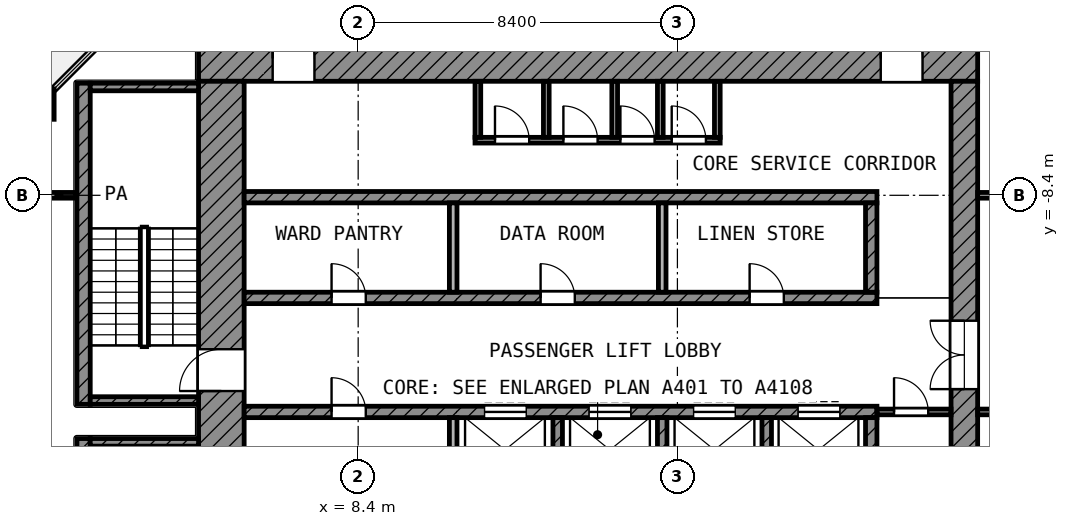
"""IFC4 building model, lengths in metres.
Left out: names, types, materials, properties, quantities, classifications, styles, units other than length and angle.
Written with IfcOpenShell. Run it as: python <this file> out.ifc"""

import sys

from ifc_helpers import new_model, si_unit, direction, frame, frame_2d, origin, origin_2d, place, context, subcontext, project, spatial, rectangle, extrude, element, fill, save


model = new_model("IFC4")
c1 = context("Model", 3, precision=1e-05, world=origin(), true_north=direction((0.0, 1.0)))
c2 = subcontext(c1, "Body", "Model", "MODEL_VIEW")
j1 = project(units=[si_unit("LENGTHUNIT", "METRE"), si_unit("PLANEANGLEUNIT", "RADIAN")], contexts=[c1])
p1 = place(None, origin())
s1 = spatial("IfcSite", under=j1, at=p1, CompositionType="ELEMENT")
p2 = place(p1, origin())
s2 = spatial("IfcBuilding", under=s1, at=p2, CompositionType="ELEMENT")
p3 = place(p2, frame((0.0, 0.0, 328.0)))
s3 = spatial("IfcBuildingStorey", under=s2, at=p3, CompositionType="ELEMENT", Elevation=328.0)
p4 = place(p3, frame((0.0, -6.0, 0.0), z_axis=(0.0, 0.0, 1.0), x_axis=(1.0, 0.0, 0.0)))
e1 = element("IfcColumn", 1, at=p4, inside=s3, PredefinedType="COLUMN", context=c2, shape_type="SweptSolid", body=[
    extrude(rectangle(XDim=0.8, YDim=0.8, at=origin_2d()), origin(), (0.0, 0.0, 1.0), 4.2),
])
p5 = place(p3, frame((4.2, -4.8, 0.0), z_axis=(0.0, 0.0, 1.0), x_axis=(1.0, 0.0, 0.0)))
e2 = element("IfcWall", 2, at=p5, inside=s3, PredefinedType="SHEAR", context=c2, shape_type="SweptSolid", body=[
    extrude(rectangle(XDim=20.5, YDim=1.2, at=frame_2d((10.25, 0.0))), origin(), (0.0, 0.0, 1.0), 3.78),
])
p6 = place(p5, frame((1.95, 0.0, 0.0)))
e3 = element("IfcOpeningElement", 3, at=p6, cuts=e2, PredefinedType="OPENING", context=c2, shape_type="SweptSolid", body=[
    extrude(rectangle(XDim=1.1, YDim=2.1, at=frame_2d((0.55, 1.05))), frame((0.0, 0.61, 0.0), z_axis=(0.0, -1.0, 0.0), x_axis=(1.0, 0.0, 0.0)), (0.0, 0.0, 1.0), 1.22),
])
p7 = place(p5, frame((17.95, 0.0, 0.0)))
e4 = element("IfcOpeningElement", 4, at=p7, cuts=e2, PredefinedType="OPENING", context=c2, shape_type="SweptSolid", body=[
    extrude(rectangle(XDim=1.1, YDim=2.1, at=frame_2d((0.55, 1.05))), frame((0.0, 0.61, 0.0), z_axis=(0.0, -1.0, 0.0), x_axis=(1.0, 0.0, 0.0)), (0.0, 0.0, 1.0), 1.22),
])
p8 = place(p3, frame((4.8, -24.7, 0.0), z_axis=(0.0, 0.0, 1.0), x_axis=(0.0, 1.0, 0.0)))
e5 = element("IfcWall", 5, at=p8, inside=s3, PredefinedType="SHEAR", context=c2, shape_type="SweptSolid", body=[
    extrude(rectangle(XDim=19.3, YDim=1.2, at=frame_2d((9.65, 0.0))), origin(), (0.0, 0.0, 1.0), 3.78),
])
p9 = place(p8, frame((11.15, 0.0, 0.0)))
e6 = element("IfcOpeningElement", 6, at=p9, cuts=e5, PredefinedType="OPENING", context=c2, shape_type="SweptSolid", body=[
    extrude(rectangle(XDim=1.1, YDim=2.1, at=frame_2d((0.55, 1.05))), frame((0.0, 0.61, 0.0), z_axis=(0.0, -1.0, 0.0), x_axis=(1.0, 0.0, 0.0)), (0.0, 0.0, 1.0), 1.22),
])
p10 = place(p8, frame((1.85, 0.0, 0.0)))
e7 = element("IfcOpeningElement", 7, at=p10, cuts=e5, PredefinedType="OPENING", context=c2, shape_type="SweptSolid", body=[
    extrude(rectangle(XDim=1.1, YDim=2.1, at=frame_2d((0.55, 1.05))), frame((0.0, 0.61, 0.0), z_axis=(0.0, -1.0, 0.0), x_axis=(1.0, 0.0, 0.0)), (0.0, 0.0, 1.0), 1.22),
])
p11 = place(p3, frame((24.35, -24.0, 0.0), z_axis=(0.0, 0.0, 1.0), x_axis=(0.0, 1.0, 0.0)))
e8 = element("IfcWall", 8, at=p11, inside=s3, PredefinedType="SHEAR", context=c2, shape_type="SweptSolid", body=[
    extrude(rectangle(XDim=18.6, YDim=0.7, at=frame_2d((9.3, 0.0))), origin(), (0.0, 0.0, 1.0), 3.78),
])
p12 = place(p11, frame((10.5, 0.0, 0.0)))
e9 = element("IfcOpeningElement", 9, at=p12, cuts=e8, PredefinedType="OPENING", context=c2, shape_type="SweptSolid", body=[
    extrude(rectangle(XDim=1.8, YDim=2.1, at=frame_2d((0.9, 1.05))), frame((0.0, 0.36, 0.0), z_axis=(0.0, -1.0, 0.0), x_axis=(1.0, 0.0, 0.0)), (0.0, 0.0, 1.0), 0.72),
])
p13 = place(p3, frame((5.4, -8.45, 0.0), z_axis=(0.0, 0.0, 1.0), x_axis=(1.0, 0.0, 0.0)))
e10 = element("IfcWall", 10, at=p13, inside=s3, PredefinedType="SHEAR", context=c2, shape_type="SweptSolid", body=[
    extrude(rectangle(XDim=16.65, YDim=0.3, at=frame_2d((8.325, 0.0))), origin(), (0.0, 0.0, 1.0), 3.78),
])
p14 = place(p3, frame((5.4, -11.1, 0.0), z_axis=(0.0, 0.0, 1.0), x_axis=(1.0, 0.0, 0.0)))
e11 = element("IfcWall", 11, at=p14, inside=s3, PredefinedType="SHEAR", context=c2, shape_type="SweptSolid", body=[
    extrude(rectangle(XDim=16.65, YDim=0.3, at=frame_2d((8.325, 0.0))), origin(), (0.0, 0.0, 1.0), 3.78),
])
p15 = place(p14, frame((2.3, 0.0, 0.0)))
e12 = element("IfcOpeningElement", 12, at=p15, cuts=e11, PredefinedType="OPENING", context=c2, shape_type="SweptSolid", body=[
    extrude(rectangle(XDim=0.9, YDim=2.1, at=frame_2d((0.45, 1.05))), frame((0.0, 0.16, 0.0), z_axis=(0.0, -1.0, 0.0), x_axis=(1.0, 0.0, 0.0)), (0.0, 0.0, 1.0), 0.32),
])
p16 = place(p14, frame((7.8, 0.0, 0.0)))
e13 = element("IfcOpeningElement", 13, at=p16, cuts=e11, PredefinedType="OPENING", context=c2, shape_type="SweptSolid", body=[
    extrude(rectangle(XDim=0.9, YDim=2.1, at=frame_2d((0.45, 1.05))), frame((0.0, 0.16, 0.0), z_axis=(0.0, -1.0, 0.0), x_axis=(1.0, 0.0, 0.0)), (0.0, 0.0, 1.0), 0.32),
])
p17 = place(p14, frame((13.3, 0.0, 0.0)))
e14 = element("IfcOpeningElement", 14, at=p17, cuts=e11, PredefinedType="OPENING", context=c2, shape_type="SweptSolid", body=[
    extrude(rectangle(XDim=0.9, YDim=2.1, at=frame_2d((0.45, 1.05))), frame((0.0, 0.16, 0.0), z_axis=(0.0, -1.0, 0.0), x_axis=(1.0, 0.0, 0.0)), (0.0, 0.0, 1.0), 0.32),
])
p18 = place(p3, frame((5.4, -14.1, 0.0), z_axis=(0.0, 0.0, 1.0), x_axis=(1.0, 0.0, 0.0)))
e15 = element("IfcWall", 15, at=p18, inside=s3, PredefinedType="SHEAR", context=c2, shape_type="SweptSolid", body=[
    extrude(rectangle(XDim=16.65, YDim=0.3, at=frame_2d((8.325, 0.0))), origin(), (0.0, 0.0, 1.0), 3.78),
])
p19 = place(p18, frame((6.325, 0.0, 0.0)))
e16 = element("IfcOpeningElement", 16, at=p19, cuts=e15, PredefinedType="OPENING", context=c2, shape_type="SweptSolid", body=[
    extrude(rectangle(XDim=1.1, YDim=2.1, at=frame_2d((0.55, 1.05))), frame((0.0, 0.16, 0.0), z_axis=(0.0, -1.0, 0.0), x_axis=(1.0, 0.0, 0.0)), (0.0, 0.0, 1.0), 0.32),
])
p20 = place(p18, frame((9.075, 0.0, 0.0)))
e17 = element("IfcOpeningElement", 17, at=p20, cuts=e15, PredefinedType="OPENING", context=c2, shape_type="SweptSolid", body=[
    extrude(rectangle(XDim=1.1, YDim=2.1, at=frame_2d((0.55, 1.05))), frame((0.0, 0.16, 0.0), z_axis=(0.0, -1.0, 0.0), x_axis=(1.0, 0.0, 0.0)), (0.0, 0.0, 1.0), 0.32),
])
p21 = place(p18, frame((11.825, 0.0, 0.0)))
e18 = element("IfcOpeningElement", 18, at=p21, cuts=e15, PredefinedType="OPENING", context=c2, shape_type="SweptSolid", body=[
    extrude(rectangle(XDim=1.1, YDim=2.1, at=frame_2d((0.55, 1.05))), frame((0.0, 0.16, 0.0), z_axis=(0.0, -1.0, 0.0), x_axis=(1.0, 0.0, 0.0)), (0.0, 0.0, 1.0), 0.32),
])
p22 = place(p18, frame((14.575, 0.0, 0.0)))
e19 = element("IfcOpeningElement", 19, at=p22, cuts=e15, PredefinedType="OPENING", context=c2, shape_type="SweptSolid", body=[
    extrude(rectangle(XDim=1.1, YDim=2.1, at=frame_2d((0.55, 1.05))), frame((0.0, 0.16, 0.0), z_axis=(0.0, -1.0, 0.0), x_axis=(1.0, 0.0, 0.0)), (0.0, 0.0, 1.0), 0.32),
])
p23 = place(p18, frame((2.3, 0.0, 0.0)))
e20 = element("IfcOpeningElement", 20, at=p23, cuts=e15, PredefinedType="OPENING", context=c2, shape_type="SweptSolid", body=[
    extrude(rectangle(XDim=0.9, YDim=2.1, at=frame_2d((0.45, 1.05))), frame((0.0, 0.16, 0.0), z_axis=(0.0, -1.0, 0.0), x_axis=(1.0, 0.0, 0.0)), (0.0, 0.0, 1.0), 0.32),
])
p24 = place(p3, frame((21.9, -10.95, 0.0), z_axis=(0.0, 0.0, 1.0), x_axis=(0.0, 1.0, 0.0)))
e21 = element("IfcWall", 21, at=p24, inside=s3, PredefinedType="SHEAR", context=c2, shape_type="SweptSolid", body=[
    extrude(rectangle(XDim=2.35, YDim=0.3, at=frame_2d((1.175, 0.0))), origin(), (0.0, 0.0, 1.0), 3.78),
])
p25 = place(p3, frame((21.9, -16.6, 0.0), z_axis=(0.0, 0.0, 1.0), x_axis=(0.0, 1.0, 0.0)))
e22 = element("IfcWall", 22, at=p25, inside=s3, PredefinedType="SHEAR", context=c2, shape_type="SweptSolid", body=[
    extrude(rectangle(XDim=2.35, YDim=0.3, at=frame_2d((1.175, 0.0))), origin(), (0.0, 0.0, 1.0), 3.78),
])
for number, where, z_axis, x_axis in (
    (23, (10.9, -10.95, 0.0), (0.0, 0.0, 1.0), (0.0, 1.0, 0.0)),
    (24, (16.4, -10.95, 0.0), (0.0, 0.0, 1.0), (0.0, 1.0, 0.0)),
):
    element("IfcWall", number, at=place(p3, frame(where, z_axis=z_axis, x_axis=x_axis)), inside=s3, PredefinedType="PARTITIONING", context=c2, shape_type="SweptSolid", body=[
        extrude(rectangle(XDim=2.35, YDim=0.2, at=frame_2d((1.175, 0.0))), origin(), (0.0, 0.0, 1.0), 3.78),
    ])
p26 = place(p3, frame((10.9, -16.6, 0.0), z_axis=(0.0, 0.0, 1.0), x_axis=(0.0, 1.0, 0.0)))
e25 = element("IfcWall", 25, at=p26, inside=s3, PredefinedType="PARTITIONING", context=c2, shape_type="SweptSolid", body=[
    extrude(rectangle(XDim=2.35, YDim=0.2, at=frame_2d((1.175, 0.0))), origin(), (0.0, 0.0, 1.0), 3.78),
])
for number, where, z_axis, x_axis in (
    (26, (13.65, -16.6, 0.0), (0.0, 0.0, 1.0), (0.0, 1.0, 0.0)),
    (27, (16.4, -16.6, 0.0), (0.0, 0.0, 1.0), (0.0, 1.0, 0.0)),
    (28, (19.15, -16.6, 0.0), (0.0, 0.0, 1.0), (0.0, 1.0, 0.0)),
):
    element("IfcWall", number, at=place(p3, frame(where, z_axis=z_axis, x_axis=x_axis)), inside=s3, PredefinedType="SHEAR", context=c2, shape_type="SweptSolid", body=[
        extrude(rectangle(XDim=2.35, YDim=0.25, at=frame_2d((1.175, 0.0))), origin(), (0.0, 0.0, 1.0), 3.78),
    ])
p27 = place(p3, frame((22.05, -14.1, 0.0), z_axis=(0.0, 0.0, 1.0), x_axis=(1.0, 0.0, 0.0)))
e29 = element("IfcWall", 29, at=p27, inside=s3, PredefinedType="PARTITIONING", context=c2, shape_type="SweptSolid", body=[
    extrude(rectangle(XDim=1.95, YDim=0.15, at=frame_2d((0.975, 0.0))), origin(), (0.0, 0.0, 1.0), 3.78),
])
p28 = place(p27, frame((0.45, 0.0, 0.0)))
e30 = element("IfcOpeningElement", 30, at=p28, cuts=e29, PredefinedType="OPENING", context=c2, shape_type="SweptSolid", body=[
    extrude(rectangle(XDim=0.9, YDim=2.1, at=frame_2d((0.45, 1.05))), frame((0.0, 0.085, 0.0), z_axis=(0.0, -1.0, 0.0), x_axis=(1.0, 0.0, 0.0)), (0.0, 0.0, 1.0), 0.17),
])
p29 = place(p3, frame((11.475, -6.95, 0.0), z_axis=(0.0, 0.0, 1.0), x_axis=(1.0, 0.0, 0.0)))
e31 = element("IfcWall", 31, at=p29, inside=s3, PredefinedType="PARTITIONING", context=c2, shape_type="SweptSolid", body=[
    extrude(rectangle(XDim=6.45, YDim=0.15, at=frame_2d((3.225, 0.0))), origin(), (0.0, 0.0, 1.0), 3.78),
])
p30 = place(p29, frame((0.525, 0.0, 0.0)))
e32 = element("IfcOpeningElement", 32, at=p30, cuts=e31, PredefinedType="OPENING", context=c2, shape_type="SweptSolid", body=[
    extrude(rectangle(XDim=0.9, YDim=2.1, at=frame_2d((0.45, 1.05))), frame((0.0, 0.085, 0.0), z_axis=(0.0, -1.0, 0.0), x_axis=(1.0, 0.0, 0.0)), (0.0, 0.0, 1.0), 0.17),
])
p31 = place(p29, frame((2.325, 0.0, 0.0)))
e33 = element("IfcOpeningElement", 33, at=p31, cuts=e31, PredefinedType="OPENING", context=c2, shape_type="SweptSolid", body=[
    extrude(rectangle(XDim=0.9, YDim=2.1, at=frame_2d((0.45, 1.05))), frame((0.0, 0.085, 0.0), z_axis=(0.0, -1.0, 0.0), x_axis=(1.0, 0.0, 0.0)), (0.0, 0.0, 1.0), 0.17),
])
p32 = place(p29, frame((3.825, 0.0, 0.0)))
e34 = element("IfcOpeningElement", 34, at=p32, cuts=e31, PredefinedType="OPENING", context=c2, shape_type="SweptSolid", body=[
    extrude(rectangle(XDim=0.9, YDim=2.1, at=frame_2d((0.45, 1.05))), frame((0.0, 0.085, 0.0), z_axis=(0.0, -1.0, 0.0), x_axis=(1.0, 0.0, 0.0)), (0.0, 0.0, 1.0), 0.17),
])
p33 = place(p29, frame((5.175, 0.0, 0.0)))
e35 = element("IfcOpeningElement", 35, at=p33, cuts=e31, PredefinedType="OPENING", context=c2, shape_type="SweptSolid", body=[
    extrude(rectangle(XDim=0.9, YDim=2.1, at=frame_2d((0.45, 1.05))), frame((0.0, 0.085, 0.0), z_axis=(0.0, -1.0, 0.0), x_axis=(1.0, 0.0, 0.0)), (0.0, 0.0, 1.0), 0.17),
])
for number, where, z_axis, x_axis in (
    (36, (11.55, -6.875, 0.0), (0.0, 0.0, 1.0), (0.0, 1.0, 0.0)),
    (37, (13.35, -6.875, 0.0), (0.0, 0.0, 1.0), (0.0, 1.0, 0.0)),
    (38, (15.15, -6.875, 0.0), (0.0, 0.0, 1.0), (0.0, 1.0, 0.0)),
    (39, (16.35, -6.875, 0.0), (0.0, 0.0, 1.0), (0.0, 1.0, 0.0)),
    (40, (17.85, -6.875, 0.0), (0.0, 0.0, 1.0), (0.0, 1.0, 0.0)),
):
    element("IfcWall", number, at=place(p3, frame(where, z_axis=z_axis, x_axis=x_axis)), inside=s3, PredefinedType="PARTITIONING", context=c2, shape_type="SweptSolid", body=[
        extrude(rectangle(XDim=1.475, YDim=0.15, at=frame_2d((0.738, 0.0))), origin(), (0.0, 0.0, 1.0), 3.78),
    ])
p34 = place(p3, frame((1.175, -13.9, 0.0), z_axis=(0.0, 0.0, 1.0), x_axis=(0.0, 1.0, 0.0)))
e41 = element("IfcWall", 41, at=p34, inside=s3, PredefinedType="SHEAR", context=c2, shape_type="SweptSolid", body=[
    extrude(rectangle(XDim=8.45, YDim=0.35, at=frame_2d((4.225, 0.0))), origin(), (0.0, 0.0, 1.0), 3.78),
])
for number, where, z_axis, x_axis in (
    (42, (1.35, -5.55, 0.0), (0.0, 0.0, 1.0), (1.0, 0.0, 0.0)),
    (43, (1.35, -13.8, 0.0), (0.0, 0.0, 1.0), (1.0, 0.0, 0.0)),
):
    element("IfcWall", number, at=place(p3, frame(where, z_axis=z_axis, x_axis=x_axis)), inside=s3, PredefinedType="SHEAR", context=c2, shape_type="SweptSolid", body=[
        extrude(rectangle(XDim=2.85, YDim=0.2, at=frame_2d((1.425, 0.0))), origin(), (0.0, 0.0, 1.0), 3.78),
    ])
p35 = place(p3, frame((1.175, -23.25, 0.0), z_axis=(0.0, 0.0, 1.0), x_axis=(0.0, 1.0, 0.0)))
e44 = element("IfcWall", 44, at=p35, inside=s3, PredefinedType="SHEAR", context=c2, shape_type="SweptSolid", body=[
    extrude(rectangle(XDim=8.45, YDim=0.35, at=frame_2d((4.225, 0.0))), origin(), (0.0, 0.0, 1.0), 3.78),
])
p36 = place(p3, frame((1.35, -14.9, 0.0), z_axis=(0.0, 0.0, 1.0), x_axis=(1.0, 0.0, 0.0)))
e45 = element("IfcWall", 45, at=p36, inside=s3, PredefinedType="SHEAR", context=c2, shape_type="SweptSolid", body=[
    extrude(rectangle(XDim=2.85, YDim=0.2, at=frame_2d((1.425, 0.0))), origin(), (0.0, 0.0, 1.0), 3.78),
])
p37 = place(p3, frame((24.7, -14.1, 0.0), z_axis=(0.0, 0.0, 1.0), x_axis=(1.0, 0.0, 0.0)))
e46 = element("IfcWall", 46, at=p37, inside=s3, PredefinedType="PARTITIONING", context=c2, shape_type="SweptSolid", body=[
    extrude(rectangle(XDim=4.625, YDim=0.15, at=frame_2d((2.312, 0.0))), origin(), (0.0, 0.0, 1.0), 3.78),
])
p38 = place(p37, frame((1.85, 0.0, 0.0)))
e47 = element("IfcOpeningElement", 47, at=p38, cuts=e46, PredefinedType="OPENING", context=c2, shape_type="SweptSolid", body=[
    extrude(rectangle(XDim=1.5, YDim=2.1, at=frame_2d((0.75, 1.05))), frame((0.0, 0.085, 0.0), z_axis=(0.0, -1.0, 0.0), x_axis=(1.0, 0.0, 0.0)), (0.0, 0.0, 1.0), 0.17),
])
p39 = place(p3, frame((0.08, -8.4, 0.0), z_axis=(0.0, 0.0, 1.0), x_axis=(1.0, 0.0, 0.0)))
e48 = element("IfcWall", 48, at=p39, inside=s3, PredefinedType="PARTITIONING", context=c2, shape_type="SweptSolid", body=[
    extrude(rectangle(XDim=0.89, YDim=0.15, at=frame_2d((0.445, 0.0))), origin(), (0.0, 0.0, 1.0), 3.78),
])
p40 = place(p3, frame((24.7, -8.4, 0.0), z_axis=(0.0, 0.0, 1.0), x_axis=(1.0, 0.0, 0.0)))
e49 = element("IfcWall", 49, at=p40, inside=s3, PredefinedType="PARTITIONING", context=c2, shape_type="SweptSolid", body=[
    extrude(rectangle(XDim=15.582, YDim=0.15, at=frame_2d((7.791, 0.0))), origin(), (0.0, 0.0, 1.0), 3.78),
])
p41 = place(p40, frame((1.85, 0.0, 0.0)))
e50 = element("IfcOpeningElement", 50, at=p41, cuts=e49, PredefinedType="OPENING", context=c2, shape_type="SweptSolid", body=[
    extrude(rectangle(XDim=1.2, YDim=2.1, at=frame_2d((0.6, 1.05))), frame((0.0, 0.085, 0.0), z_axis=(0.0, -1.0, 0.0), x_axis=(1.0, 0.0, 0.0)), (0.0, 0.0, 1.0), 0.17),
])
p42 = place(p40, frame((6.7, 0.0, 0.0)))
e51 = element("IfcOpeningElement", 51, at=p42, cuts=e49, PredefinedType="OPENING", context=c2, shape_type="SweptSolid", body=[
    extrude(rectangle(XDim=1.2, YDim=2.1, at=frame_2d((0.6, 1.05))), frame((0.0, 0.085, 0.0), z_axis=(0.0, -1.0, 0.0), x_axis=(1.0, 0.0, 0.0)), (0.0, 0.0, 1.0), 0.17),
])
p43 = place(p40, frame((9.4, 0.0, 0.0)))
e52 = element("IfcOpeningElement", 52, at=p43, cuts=e49, PredefinedType="OPENING", context=c2, shape_type="SweptSolid", body=[
    extrude(rectangle(XDim=1.2, YDim=2.1, at=frame_2d((0.6, 1.05))), frame((0.0, 0.085, 0.0), z_axis=(0.0, -1.0, 0.0), x_axis=(1.0, 0.0, 0.0)), (0.0, 0.0, 1.0), 0.17),
])
p44 = place(p19, origin())
e53 = element("IfcDoor", 53, at=p44, inside=s3, OperationType="DOUBLE_DOOR_SLIDING", PredefinedType="DOOR", context=c2, shape_type="SweptSolid", body=[
    extrude(rectangle(XDim=1.1, YDim=2.1, at=frame_2d((0.55, 1.05))), frame((0.0, 0.025, 0.0), z_axis=(0.0, -1.0, 0.0), x_axis=(1.0, 0.0, 0.0)), (0.0, 0.0, 1.0), 0.05),
])
fill(e16, e53)
p45 = place(p20, origin())
e54 = element("IfcDoor", 54, at=p45, inside=s3, OperationType="DOUBLE_DOOR_SLIDING", PredefinedType="DOOR", context=c2, shape_type="SweptSolid", body=[
    extrude(rectangle(XDim=1.1, YDim=2.1, at=frame_2d((0.55, 1.05))), frame((0.0, 0.025, 0.0), z_axis=(0.0, -1.0, 0.0), x_axis=(1.0, 0.0, 0.0)), (0.0, 0.0, 1.0), 0.05),
])
fill(e17, e54)
p46 = place(p21, origin())
e55 = element("IfcDoor", 55, at=p46, inside=s3, OperationType="DOUBLE_DOOR_SLIDING", PredefinedType="DOOR", context=c2, shape_type="SweptSolid", body=[
    extrude(rectangle(XDim=1.1, YDim=2.1, at=frame_2d((0.55, 1.05))), frame((0.0, 0.025, 0.0), z_axis=(0.0, -1.0, 0.0), x_axis=(1.0, 0.0, 0.0)), (0.0, 0.0, 1.0), 0.05),
])
fill(e18, e55)
p47 = place(p22, origin())
e56 = element("IfcDoor", 56, at=p47, inside=s3, OperationType="DOUBLE_DOOR_SLIDING", PredefinedType="DOOR", context=c2, shape_type="SweptSolid", body=[
    extrude(rectangle(XDim=1.1, YDim=2.1, at=frame_2d((0.55, 1.05))), frame((0.0, 0.025, 0.0), z_axis=(0.0, -1.0, 0.0), x_axis=(1.0, 0.0, 0.0)), (0.0, 0.0, 1.0), 0.05),
])
fill(e19, e56)
p48 = place(p9, origin())
e57 = element("IfcDoor", 57, at=p48, inside=s3, OperationType="SINGLE_SWING_LEFT", PredefinedType="DOOR", context=c2, shape_type="SweptSolid", body=[
    extrude(rectangle(XDim=1.1, YDim=2.1, at=frame_2d((0.55, 1.05))), frame((0.0, 0.025, 0.0), z_axis=(0.0, -1.0, 0.0), x_axis=(1.0, 0.0, 0.0)), (0.0, 0.0, 1.0), 0.05),
])
fill(e6, e57)
p49 = place(p6, origin())
e58 = element("IfcDoor", 58, at=p49, inside=s3, OperationType="SINGLE_SWING_LEFT", PredefinedType="DOOR", context=c2, shape_type="SweptSolid", body=[
    extrude(rectangle(XDim=1.1, YDim=2.1, at=frame_2d((0.55, 1.05))), frame((0.0, 0.025, 0.0), z_axis=(0.0, -1.0, 0.0), x_axis=(1.0, 0.0, 0.0)), (0.0, 0.0, 1.0), 0.05),
])
fill(e3, e58)
p50 = place(p7, origin())
e59 = element("IfcDoor", 59, at=p50, inside=s3, OperationType="SINGLE_SWING_LEFT", PredefinedType="DOOR", context=c2, shape_type="SweptSolid", body=[
    extrude(rectangle(XDim=1.1, YDim=2.1, at=frame_2d((0.55, 1.05))), frame((0.0, 0.025, 0.0), z_axis=(0.0, -1.0, 0.0), x_axis=(1.0, 0.0, 0.0)), (0.0, 0.0, 1.0), 0.05),
])
fill(e4, e59)
p51 = place(p12, origin())
e60 = element("IfcDoor", 60, at=p51, inside=s3, OperationType="DOUBLE_DOOR_SINGLE_SWING", PredefinedType="DOOR", context=c2, shape_type="SweptSolid", body=[
    extrude(rectangle(XDim=1.8, YDim=2.1, at=frame_2d((0.9, 1.05))), frame((0.0, 0.025, 0.0), z_axis=(0.0, -1.0, 0.0), x_axis=(1.0, 0.0, 0.0)), (0.0, 0.0, 1.0), 0.05),
])
fill(e9, e60)
p52 = place(p30, origin())
e61 = element("IfcDoor", 61, at=p52, inside=s3, OperationType="SINGLE_SWING_LEFT", PredefinedType="DOOR", context=c2, shape_type="SweptSolid", body=[
    extrude(rectangle(XDim=0.9, YDim=2.1, at=frame_2d((0.45, 1.05))), frame((0.0, 0.025, 0.0), z_axis=(0.0, -1.0, 0.0), x_axis=(1.0, 0.0, 0.0)), (0.0, 0.0, 1.0), 0.05),
])
fill(e32, e61)
p53 = place(p31, origin())
e62 = element("IfcDoor", 62, at=p53, inside=s3, OperationType="SINGLE_SWING_LEFT", PredefinedType="DOOR", context=c2, shape_type="SweptSolid", body=[
    extrude(rectangle(XDim=0.9, YDim=2.1, at=frame_2d((0.45, 1.05))), frame((0.0, 0.025, 0.0), z_axis=(0.0, -1.0, 0.0), x_axis=(1.0, 0.0, 0.0)), (0.0, 0.0, 1.0), 0.05),
])
fill(e33, e62)
p54 = place(p32, origin())
e63 = element("IfcDoor", 63, at=p54, inside=s3, OperationType="SINGLE_SWING_LEFT", PredefinedType="DOOR", context=c2, shape_type="SweptSolid", body=[
    extrude(rectangle(XDim=0.9, YDim=2.1, at=frame_2d((0.45, 1.05))), frame((0.0, 0.025, 0.0), z_axis=(0.0, -1.0, 0.0), x_axis=(1.0, 0.0, 0.0)), (0.0, 0.0, 1.0), 0.05),
])
fill(e34, e63)
p55 = place(p33, origin())
e64 = element("IfcDoor", 64, at=p55, inside=s3, OperationType="SINGLE_SWING_LEFT", PredefinedType="DOOR", context=c2, shape_type="SweptSolid", body=[
    extrude(rectangle(XDim=0.9, YDim=2.1, at=frame_2d((0.45, 1.05))), frame((0.0, 0.025, 0.0), z_axis=(0.0, -1.0, 0.0), x_axis=(1.0, 0.0, 0.0)), (0.0, 0.0, 1.0), 0.05),
])
fill(e35, e64)
p56 = place(p28, origin())
e65 = element("IfcDoor", 65, at=p56, inside=s3, OperationType="SINGLE_SWING_LEFT", PredefinedType="DOOR", context=c2, shape_type="SweptSolid", body=[
    extrude(rectangle(XDim=0.9, YDim=2.1, at=frame_2d((0.45, 1.05))), frame((0.0, 0.025, 0.0), z_axis=(0.0, -1.0, 0.0), x_axis=(1.0, 0.0, 0.0)), (0.0, 0.0, 1.0), 0.05),
])
fill(e30, e65)
p57 = place(p15, origin())
e66 = element("IfcDoor", 66, at=p57, inside=s3, OperationType="SINGLE_SWING_LEFT", PredefinedType="DOOR", context=c2, shape_type="SweptSolid", body=[
    extrude(rectangle(XDim=0.9, YDim=2.1, at=frame_2d((0.45, 1.05))), frame((0.0, 0.025, 0.0), z_axis=(0.0, -1.0, 0.0), x_axis=(1.0, 0.0, 0.0)), (0.0, 0.0, 1.0), 0.05),
])
fill(e12, e66)
p58 = place(p16, origin())
e67 = element("IfcDoor", 67, at=p58, inside=s3, OperationType="SINGLE_SWING_LEFT", PredefinedType="DOOR", context=c2, shape_type="SweptSolid", body=[
    extrude(rectangle(XDim=0.9, YDim=2.1, at=frame_2d((0.45, 1.05))), frame((0.0, 0.025, 0.0), z_axis=(0.0, -1.0, 0.0), x_axis=(1.0, 0.0, 0.0)), (0.0, 0.0, 1.0), 0.05),
])
fill(e13, e67)
p59 = place(p17, origin())
e68 = element("IfcDoor", 68, at=p59, inside=s3, OperationType="SINGLE_SWING_LEFT", PredefinedType="DOOR", context=c2, shape_type="SweptSolid", body=[
    extrude(rectangle(XDim=0.9, YDim=2.1, at=frame_2d((0.45, 1.05))), frame((0.0, 0.025, 0.0), z_axis=(0.0, -1.0, 0.0), x_axis=(1.0, 0.0, 0.0)), (0.0, 0.0, 1.0), 0.05),
])
fill(e14, e68)
p60 = place(p23, origin())
e69 = element("IfcDoor", 69, at=p60, inside=s3, OperationType="SINGLE_SWING_LEFT", PredefinedType="DOOR", context=c2, shape_type="SweptSolid", body=[
    extrude(rectangle(XDim=0.9, YDim=2.1, at=frame_2d((0.45, 1.05))), frame((0.0, 0.025, 0.0), z_axis=(0.0, -1.0, 0.0), x_axis=(1.0, 0.0, 0.0)), (0.0, 0.0, 1.0), 0.05),
])
fill(e20, e69)
save(model, sys.argv[1])
